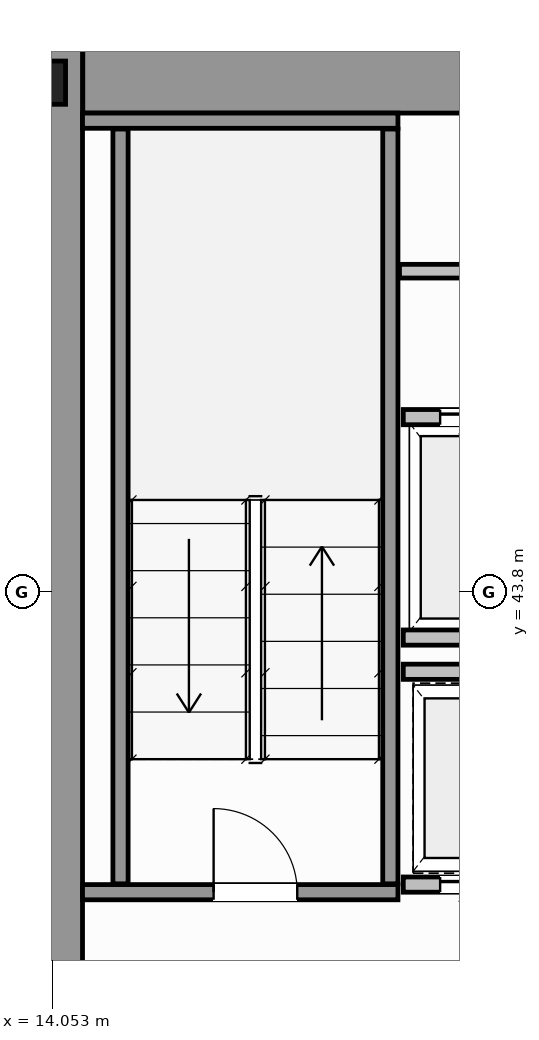
"""IFC4 building model, lengths in metres.
Left out: names, types, materials, properties, quantities, classifications, styles, units other than length and angle.
Written with IfcOpenShell. Run it as: python <this file> out.ifc"""

import sys

from ifc_helpers import new_model, si_unit, direction, frame, frame_2d, origin, origin_2d, place, context, subcontext, project, spatial, rectangle, i_section, extrude, source, transform, mapped, element, fill, save


model = new_model("IFC4")
c1 = context("Model", 3, precision=1e-05, world=origin(), true_north=direction((0.0, 1.0)))
c2 = subcontext(c1, "Body", "Model", "MODEL_VIEW")
j1 = project(units=[si_unit("LENGTHUNIT", "METRE"), si_unit("PLANEANGLEUNIT", "RADIAN")], contexts=[c1])
p1 = place(None, origin())
s1 = spatial("IfcSite", under=j1, at=p1, CompositionType="ELEMENT")
p2 = place(p1, origin())
s2 = spatial("IfcBuilding", under=s1, at=p2, CompositionType="ELEMENT")
p3 = place(p2, frame((0.0, 0.0, 18.8)))
s3 = spatial("IfcBuildingStorey", under=s2, at=p3, CompositionType="ELEMENT", Elevation=18.8)
m1 = source(origin(), c2, "Body", "SweptSolid", [
    extrude(i_section(OverallWidth=0.454, OverallDepth=0.569, WebThickness=0.078, FlangeThickness=0.08, FilletRadius=0.015, at=origin_2d()), origin(), (0.0, 0.0, 1.0), 3.8),
])
p4 = place(p3, frame((14.0, 50.5, 0.0), z_axis=(0.0, 0.0, 1.0), x_axis=(1.0, 0.0, 0.0)))
e1 = element("IfcColumn", 1, at=p4, inside=s3, PredefinedType="COLUMN", context=c2, shape_type="MappedRepresentation", body=[
    mapped(m1, transform((0.0, 0.0, 0.0), scale=1.0)),
])
p5 = place(p3, frame((14.454, 50.55, 0.0), z_axis=(0.0, 0.0, 1.0), x_axis=(1.0, 0.0, 0.0)))
e2 = element("IfcWall", 2, at=p5, inside=s3, PredefinedType="SHEAR", context=c2, shape_type="SweptSolid", body=[
    extrude(rectangle(XDim=19.544, YDim=0.9, at=frame_2d((9.772, 0.0))), origin(), (0.0, 0.0, 1.0), 3.8),
])
p6 = place(p3, frame((14.0, 36.5, 0.0), z_axis=(0.0, 0.0, 1.0), x_axis=(0.0, 1.0, 0.0)))
e3 = element("IfcWall", 3, at=p6, inside=s3, PredefinedType="SHEAR", context=c2, shape_type="SweptSolid", body=[
    extrude(rectangle(XDim=14.5, YDim=0.9, at=frame_2d((7.25, 0.0))), origin(), (0.0, 0.0, 1.0), 3.8),
])
p7 = place(p3, frame((14.45, 39.85, 0.0), z_axis=(0.0, 0.0, 1.0), x_axis=(1.0, 0.0, 0.0)))
e4 = element("IfcWall", 4, at=p7, inside=s3, PredefinedType="SOLIDWALL", context=c2, shape_type="SweptSolid", body=[
    extrude(rectangle(XDim=4.15, YDim=0.2, at=frame_2d((2.075, 0.0))), origin(), (0.0, 0.0, 1.0), 3.8),
])
p8 = place(p7, frame((1.725, 0.0, 0.0)))
e5 = element("IfcOpeningElement", 5, at=p8, cuts=e4, PredefinedType="OPENING", context=c2, shape_type="SweptSolid", body=[
    extrude(rectangle(XDim=1.1, YDim=2.15, at=frame_2d((0.55, 1.075))), frame((0.0, 0.11, 0.0), z_axis=(0.0, -1.0, 0.0), x_axis=(1.0, 0.0, 0.0)), (0.0, 0.0, 1.0), 0.22),
])
p9 = place(p3, frame((14.45, 50.0, 0.0), z_axis=(0.0, 0.0, 1.0), x_axis=(1.0, 0.0, 0.0)))
e6 = element("IfcWall", 6, at=p9, inside=s3, PredefinedType="SOLIDWALL", context=c2, shape_type="SweptSolid", body=[
    extrude(rectangle(XDim=4.15, YDim=0.2, at=frame_2d((2.075, 0.0))), origin(), (0.0, 0.0, 1.0), 3.8),
])
for number, where, z_axis, x_axis in (
    (7, (14.95, 39.96, 0.0), (0.0, 0.0, 1.0), (0.0, 1.0, 0.0)),
    (8, (18.5, 39.96, 0.0), (0.0, 0.0, 1.0), (0.0, 1.0, 0.0)),
):
    element("IfcWall", number, at=place(p3, frame(where, z_axis=z_axis, x_axis=x_axis)), inside=s3, PredefinedType="SOLIDWALL", context=c2, shape_type="SweptSolid", body=[
        extrude(rectangle(XDim=9.93, YDim=0.2, at=frame_2d((4.965, 0.0))), origin(), (0.0, 0.0, 1.0), 3.8),
    ])
p10 = place(p3, frame((18.67, 46.1, 0.0), z_axis=(0.0, 0.0, 1.0), x_axis=(1.0, 0.0, 0.0)))
e9 = element("IfcWall", 9, at=p10, inside=s3, PredefinedType="SOLIDWALL", context=c2, shape_type="SweptSolid", body=[
    extrude(rectangle(XDim=2.07, YDim=0.2, at=frame_2d((1.035, 0.0))), origin(), (0.0, 0.0, 1.0), 3.58),
])
p11 = place(p10, frame((0.485, 0.0, 0.0)))
e10 = element("IfcOpeningElement", 10, at=p11, cuts=e9, PredefinedType="OPENING", context=c2, shape_type="SweptSolid", body=[
    extrude(rectangle(XDim=1.1, YDim=2.15, at=frame_2d((0.55, 1.075))), frame((0.0, 0.11, 0.0), z_axis=(0.0, -1.0, 0.0), x_axis=(1.0, 0.0, 0.0)), (0.0, 0.0, 1.0), 0.22),
])
p12 = place(p3, frame((18.67, 43.2, 0.0), z_axis=(0.0, 0.0, 1.0), x_axis=(1.0, 0.0, 0.0)))
e11 = element("IfcWall", 11, at=p12, inside=s3, PredefinedType="SOLIDWALL", context=c2, shape_type="SweptSolid", body=[
    extrude(rectangle(XDim=2.07, YDim=0.2, at=frame_2d((1.035, 0.0))), origin(), (0.0, 0.0, 1.0), 3.58),
])
p13 = place(p3, frame((18.67, 39.95, 0.0), z_axis=(0.0, 0.0, 1.0), x_axis=(1.0, 0.0, 0.0)))
e12 = element("IfcWall", 12, at=p13, inside=s3, PredefinedType="SOLIDWALL", context=c2, shape_type="SweptSolid", body=[
    extrude(rectangle(XDim=2.07, YDim=0.2, at=frame_2d((1.035, 0.0))), origin(), (0.0, 0.0, 1.0), 3.58),
])
p14 = place(p13, frame((0.485, 0.0, 0.0)))
e13 = element("IfcOpeningElement", 13, at=p14, cuts=e12, PredefinedType="OPENING", context=c2, shape_type="SweptSolid", body=[
    extrude(rectangle(XDim=1.1, YDim=2.15, at=frame_2d((0.55, 1.075))), frame((0.0, 0.11, 0.0), z_axis=(0.0, -1.0, 0.0), x_axis=(1.0, 0.0, 0.0)), (0.0, 0.0, 1.0), 0.22),
])
p15 = place(p3, frame((18.67, 42.75, 0.0), z_axis=(0.0, 0.0, 1.0), x_axis=(1.0, 0.0, 0.0)))
e14 = element("IfcWall", 14, at=p15, inside=s3, PredefinedType="SOLIDWALL", context=c2, shape_type="SweptSolid", body=[
    extrude(rectangle(XDim=2.07, YDim=0.2, at=frame_2d((1.035, 0.0))), origin(), (0.0, 0.0, 1.0), 3.58),
])
p16 = place(p3, frame((18.62, 48.02, 0.0), z_axis=(0.0, 0.0, 1.0), x_axis=(1.0, 0.0, 0.0)))
e15 = element("IfcWall", 15, at=p16, inside=s3, PredefinedType="PLUMBINGWALL", context=c2, shape_type="SweptSolid", body=[
    extrude(rectangle(XDim=30.76, YDim=0.18, at=frame_2d((15.38, 0.0))), origin(), (0.0, 0.0, 1.0), 3.58),
])
p17 = place(p16, frame((1.655, 0.0, 0.0)))
e16 = element("IfcOpeningElement", 16, at=p17, cuts=e15, PredefinedType="OPENING", context=c2, shape_type="SweptSolid", body=[
    extrude(rectangle(XDim=0.9, YDim=2.15, at=frame_2d((0.45, 1.075))), frame((0.0, 0.1, 0.0), z_axis=(0.0, -1.0, 0.0), x_axis=(1.0, 0.0, 0.0)), (0.0, 0.0, 1.0), 0.2),
])
p18 = place(p16, frame((6.03, 0.0, 0.0)))
e17 = element("IfcOpeningElement", 17, at=p18, cuts=e15, PredefinedType="OPENING", context=c2, shape_type="SweptSolid", body=[
    extrude(rectangle(XDim=0.9, YDim=2.15, at=frame_2d((0.45, 1.075))), frame((0.0, 0.1, 0.0), z_axis=(0.0, -1.0, 0.0), x_axis=(1.0, 0.0, 0.0)), (0.0, 0.0, 1.0), 0.2),
])
p19 = place(p16, frame((10.93, 0.0, 0.0)))
e18 = element("IfcOpeningElement", 18, at=p19, cuts=e15, PredefinedType="OPENING", context=c2, shape_type="SweptSolid", body=[
    extrude(rectangle(XDim=0.9, YDim=2.15, at=frame_2d((0.45, 1.075))), frame((0.0, 0.1, 0.0), z_axis=(0.0, -1.0, 0.0), x_axis=(1.0, 0.0, 0.0)), (0.0, 0.0, 1.0), 0.2),
])
p20 = place(p16, frame((16.13, 0.0, 0.0)))
e19 = element("IfcOpeningElement", 19, at=p20, cuts=e15, PredefinedType="OPENING", context=c2, shape_type="SweptSolid", body=[
    extrude(rectangle(XDim=0.9, YDim=2.15, at=frame_2d((0.45, 1.075))), frame((0.0, 0.1, 0.0), z_axis=(0.0, -1.0, 0.0), x_axis=(1.0, 0.0, 0.0)), (0.0, 0.0, 1.0), 0.2),
])
p21 = place(p16, frame((21.73, 0.0, 0.0)))
e20 = element("IfcOpeningElement", 20, at=p21, cuts=e15, PredefinedType="OPENING", context=c2, shape_type="SweptSolid", body=[
    extrude(rectangle(XDim=0.9, YDim=2.15, at=frame_2d((0.45, 1.075))), frame((0.0, 0.1, 0.0), z_axis=(0.0, -1.0, 0.0), x_axis=(1.0, 0.0, 0.0)), (0.0, 0.0, 1.0), 0.2),
])
p22 = place(p16, frame((27.505, 0.0, 0.0)))
e21 = element("IfcOpeningElement", 21, at=p22, cuts=e15, PredefinedType="OPENING", context=c2, shape_type="SweptSolid", body=[
    extrude(rectangle(XDim=0.9, YDim=2.15, at=frame_2d((0.45, 1.075))), frame((0.0, 0.1, 0.0), z_axis=(0.0, -1.0, 0.0), x_axis=(1.0, 0.0, 0.0)), (0.0, 0.0, 1.0), 0.2),
])
m2 = source(origin(), c2, "Body", "SweptSolid", [
    extrude(rectangle(XDim=1.1, YDim=2.15, at=frame_2d((0.55, 1.075))), frame((0.0, 0.025, 0.0), z_axis=(0.0, -1.0, 0.0), x_axis=(1.0, 0.0, 0.0)), (0.0, 0.0, 1.0), 0.05),
])
p23 = place(p8, origin())
e22 = element("IfcDoor", 22, at=p23, inside=s3, OperationType="SINGLE_SWING_LEFT", PredefinedType="DOOR", context=c2, shape_type="MappedRepresentation", body=[
    mapped(m2, transform((0.0, 0.0, 0.0), scale=1.0)),
])
fill(e5, e22)
p24 = place(p11, origin())
e23 = element("IfcDoor", 23, at=p24, inside=s3, OperationType="DOUBLE_DOOR_SLIDING", PredefinedType="DOOR", context=c2, shape_type="MappedRepresentation", body=[
    mapped(m2, transform((0.0, 0.0, 0.0), scale=1.0)),
])
fill(e10, e23)
p25 = place(p14, origin())
e24 = element("IfcDoor", 24, at=p25, inside=s3, OperationType="DOUBLE_DOOR_SLIDING", PredefinedType="DOOR", context=c2, shape_type="MappedRepresentation", body=[
    mapped(m2, transform((0.0, 0.0, 0.0), scale=1.0)),
])
fill(e13, e24)
save(model, sys.argv[1])
